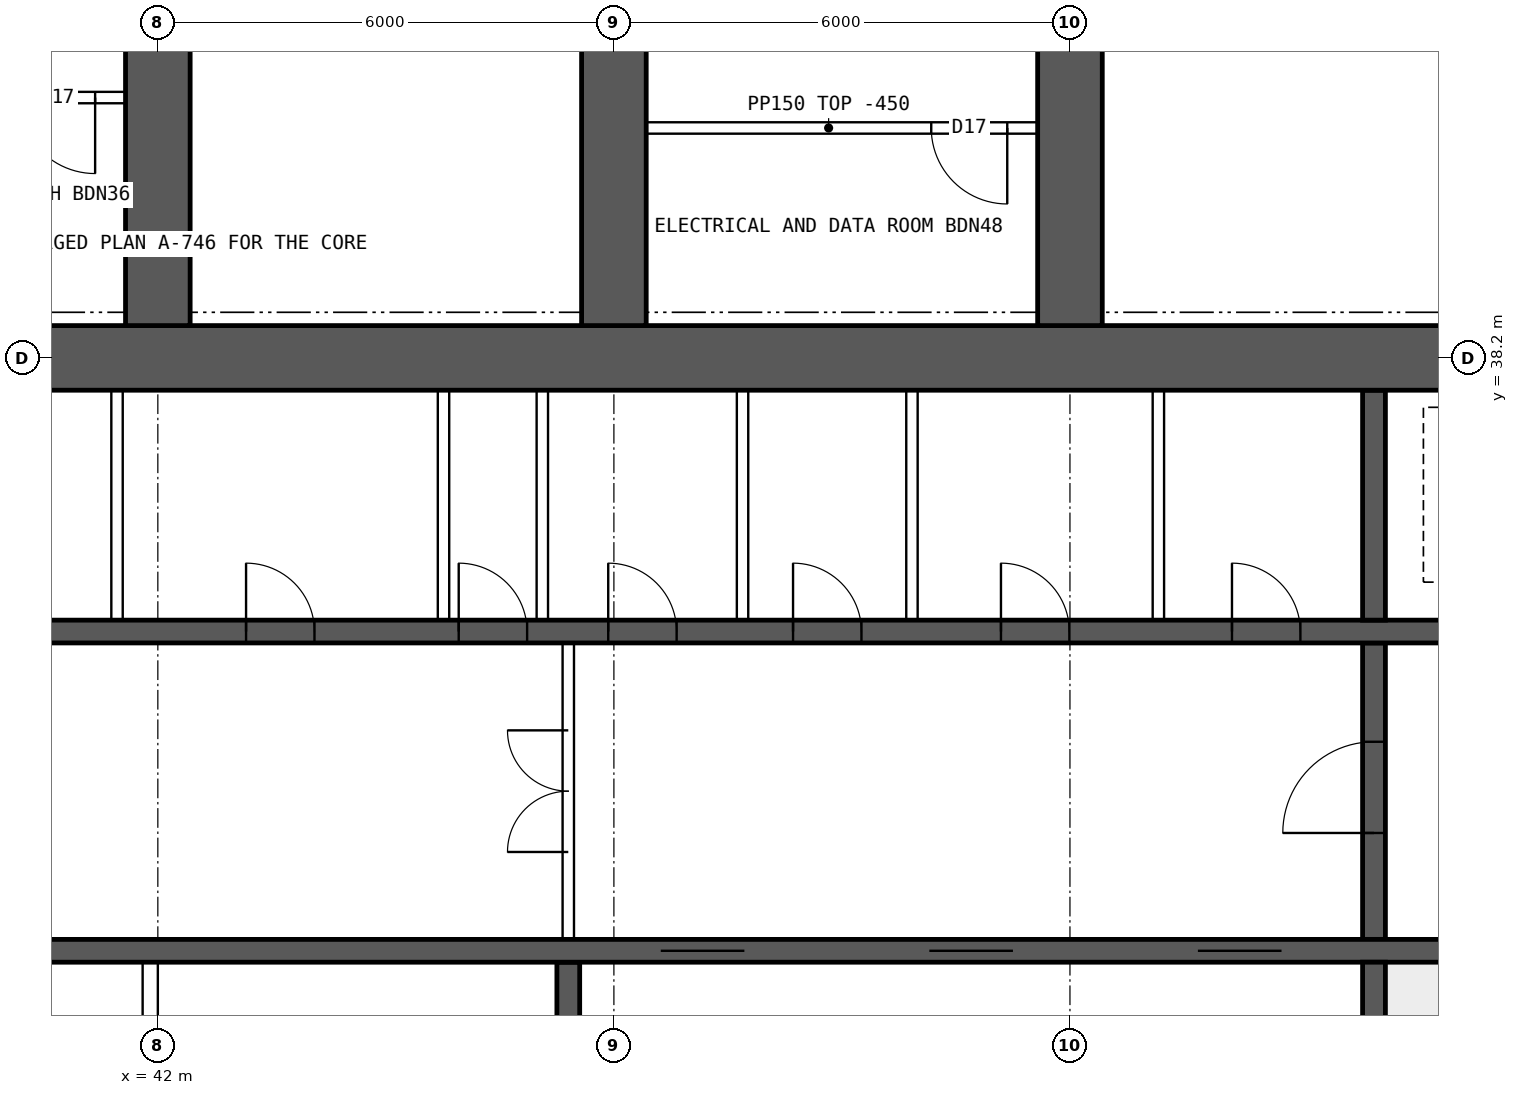
"""IFC4 building model, lengths in metres.
Left out: names, types, materials, properties, quantities, classifications, styles, units other than length and angle.
Written with IfcOpenShell. Run it as: python <this file> out.ifc"""

import sys

from ifc_helpers import new_model, si_unit, direction, frame, frame_2d, origin, place, context, subcontext, project, spatial, rectangle, extrude, element, fill, save


model = new_model("IFC4")
c1 = context("Model", 3, precision=1e-05, world=origin(), true_north=direction((0.0, 1.0)))
c2 = subcontext(c1, "Body", "Model", "MODEL_VIEW")
j1 = project(units=[si_unit("LENGTHUNIT", "METRE"), si_unit("PLANEANGLEUNIT", "RADIAN")], contexts=[c1])
p1 = place(None, origin())
s1 = spatial("IfcSite", under=j1, at=p1, CompositionType="ELEMENT")
p2 = place(p1, origin())
s2 = spatial("IfcBuilding", under=s1, at=p2, CompositionType="ELEMENT")
p3 = place(p2, frame((0.0, 0.0, 174.85)))
s3 = spatial("IfcBuildingStorey", under=s2, at=p3, CompositionType="ELEMENT", Elevation=174.85)
p4 = place(p3, frame((18.0, 38.2, 0.0), z_axis=(0.0, 0.0, 1.0), x_axis=(1.0, 0.0, 0.0)))
e1 = element("IfcWall", 1, at=p4, inside=s3, PredefinedType="SHEAR", context=c2, shape_type="SweptSolid", body=[
    extrude(rectangle(XDim=48.0, YDim=0.85, at=frame_2d((24.0, 0.0))), origin(), (0.0, 0.0, 1.0), 3.75),
])
p5 = place(p3, frame((18.425, 30.4, 0.0), z_axis=(0.0, 0.0, 1.0), x_axis=(1.0, 0.0, 0.0)))
e2 = element("IfcWall", 2, at=p5, inside=s3, PredefinedType="SHEAR", context=c2, shape_type="SweptSolid", body=[
    extrude(rectangle(XDim=47.15, YDim=0.3, at=frame_2d((23.575, 0.0))), origin(), (0.0, 0.0, 1.0), 3.75),
])
p6 = place(p5, frame((0.4, 0.0, 0.0)))
e3 = element("IfcOpeningElement", 3, at=p6, cuts=e2, PredefinedType="OPENING", context=c2, shape_type="SweptSolid", body=[
    extrude(rectangle(XDim=1.0, YDim=2.1, at=frame_2d((0.5, 1.05))), frame((0.0, 0.16, 0.0), z_axis=(0.0, -1.0, 0.0), x_axis=(1.0, 0.0, 0.0)), (0.0, 0.0, 1.0), 0.32),
])
p7 = place(p5, frame((45.75, 0.0, 0.0)))
e4 = element("IfcOpeningElement", 4, at=p7, cuts=e2, PredefinedType="OPENING", context=c2, shape_type="SweptSolid", body=[
    extrude(rectangle(XDim=1.0, YDim=2.1, at=frame_2d((0.5, 1.05))), frame((0.0, 0.16, 0.0), z_axis=(0.0, -1.0, 0.0), x_axis=(1.0, 0.0, 0.0)), (0.0, 0.0, 1.0), 0.32),
])
p8 = place(p5, frame((8.325, 0.0, 0.0)))
e5 = element("IfcOpeningElement", 5, at=p8, cuts=e2, PredefinedType="OPENING", context=c2, shape_type="SweptSolid", body=[
    extrude(rectangle(XDim=1.1, YDim=2.1, at=frame_2d((0.55, 1.05))), frame((0.0, 0.16, 0.0), z_axis=(0.0, -1.0, 0.0), x_axis=(1.0, 0.0, 0.0)), (0.0, 0.0, 1.0), 0.32),
])
p9 = place(p5, frame((10.925, 0.0, 0.0)))
e6 = element("IfcOpeningElement", 6, at=p9, cuts=e2, PredefinedType="OPENING", context=c2, shape_type="SweptSolid", body=[
    extrude(rectangle(XDim=1.1, YDim=2.1, at=frame_2d((0.55, 1.05))), frame((0.0, 0.16, 0.0), z_axis=(0.0, -1.0, 0.0), x_axis=(1.0, 0.0, 0.0)), (0.0, 0.0, 1.0), 0.32),
])
p10 = place(p5, frame((13.525, 0.0, 0.0)))
e7 = element("IfcOpeningElement", 7, at=p10, cuts=e2, PredefinedType="OPENING", context=c2, shape_type="SweptSolid", body=[
    extrude(rectangle(XDim=1.1, YDim=2.1, at=frame_2d((0.55, 1.05))), frame((0.0, 0.16, 0.0), z_axis=(0.0, -1.0, 0.0), x_axis=(1.0, 0.0, 0.0)), (0.0, 0.0, 1.0), 0.32),
])
p11 = place(p5, frame((16.125, 0.0, 0.0)))
e8 = element("IfcOpeningElement", 8, at=p11, cuts=e2, PredefinedType="OPENING", context=c2, shape_type="SweptSolid", body=[
    extrude(rectangle(XDim=1.1, YDim=2.1, at=frame_2d((0.55, 1.05))), frame((0.0, 0.16, 0.0), z_axis=(0.0, -1.0, 0.0), x_axis=(1.0, 0.0, 0.0)), (0.0, 0.0, 1.0), 0.32),
])
p12 = place(p5, frame((18.9, 0.0, 0.0)))
e9 = element("IfcOpeningElement", 9, at=p12, cuts=e2, PredefinedType="OPENING", context=c2, shape_type="SweptSolid", body=[
    extrude(rectangle(XDim=0.9, YDim=2.1, at=frame_2d((0.45, 1.05))), frame((0.0, 0.16, 0.0), z_axis=(0.0, -1.0, 0.0), x_axis=(1.0, 0.0, 0.0)), (0.0, 0.0, 1.0), 0.32),
])
p13 = place(p5, frame((30.192, 0.0, 0.0)))
e10 = element("IfcOpeningElement", 10, at=p13, cuts=e2, PredefinedType="OPENING", context=c2, shape_type="SweptSolid", body=[
    extrude(rectangle(XDim=1.1, YDim=2.1, at=frame_2d((0.55, 1.05))), frame((0.0, 0.16, 0.0), z_axis=(0.0, -1.0, 0.0), x_axis=(1.0, 0.0, 0.0)), (0.0, 0.0, 1.0), 0.32),
])
p14 = place(p5, frame((33.725, 0.0, 0.0)))
e11 = element("IfcOpeningElement", 11, at=p14, cuts=e2, PredefinedType="OPENING", context=c2, shape_type="SweptSolid", body=[
    extrude(rectangle(XDim=1.1, YDim=2.1, at=frame_2d((0.55, 1.05))), frame((0.0, 0.16, 0.0), z_axis=(0.0, -1.0, 0.0), x_axis=(1.0, 0.0, 0.0)), (0.0, 0.0, 1.0), 0.32),
])
p15 = place(p5, frame((37.258, 0.0, 0.0)))
e12 = element("IfcOpeningElement", 12, at=p15, cuts=e2, PredefinedType="OPENING", context=c2, shape_type="SweptSolid", body=[
    extrude(rectangle(XDim=1.1, YDim=2.1, at=frame_2d((0.55, 1.05))), frame((0.0, 0.16, 0.0), z_axis=(0.0, -1.0, 0.0), x_axis=(1.0, 0.0, 0.0)), (0.0, 0.0, 1.0), 0.32),
])
p16 = place(p3, frame((18.425, 34.6, 0.0), z_axis=(0.0, 0.0, 1.0), x_axis=(1.0, 0.0, 0.0)))
e13 = element("IfcWall", 13, at=p16, inside=s3, PredefinedType="SHEAR", context=c2, shape_type="SweptSolid", body=[
    extrude(rectangle(XDim=47.15, YDim=0.3, at=frame_2d((23.575, 0.0))), origin(), (0.0, 0.0, 1.0), 3.75),
])
p17 = place(p16, frame((0.9, 0.0, 0.0)))
e14 = element("IfcOpeningElement", 14, at=p17, cuts=e13, PredefinedType="OPENING", context=c2, shape_type="SweptSolid", body=[
    extrude(rectangle(XDim=1.1, YDim=2.1, at=frame_2d((0.55, 1.05))), frame((0.0, 0.16, 0.0), z_axis=(0.0, -1.0, 0.0), x_axis=(1.0, 0.0, 0.0)), (0.0, 0.0, 1.0), 0.32),
])
p18 = place(p16, frame((45.15, 0.0, 0.0)))
e15 = element("IfcOpeningElement", 15, at=p18, cuts=e13, PredefinedType="OPENING", context=c2, shape_type="SweptSolid", body=[
    extrude(rectangle(XDim=1.1, YDim=2.1, at=frame_2d((0.55, 1.05))), frame((0.0, 0.16, 0.0), z_axis=(0.0, -1.0, 0.0), x_axis=(1.0, 0.0, 0.0)), (0.0, 0.0, 1.0), 0.32),
])
p19 = place(p16, frame((4.175, 0.0, 0.0)))
e16 = element("IfcOpeningElement", 16, at=p19, cuts=e13, PredefinedType="OPENING", context=c2, shape_type="SweptSolid", body=[
    extrude(rectangle(XDim=0.9, YDim=2.1, at=frame_2d((0.45, 1.05))), frame((0.0, 0.16, 0.0), z_axis=(0.0, -1.0, 0.0), x_axis=(1.0, 0.0, 0.0)), (0.0, 0.0, 1.0), 0.32),
])
p20 = place(p16, frame((42.075, 0.0, 0.0)))
e17 = element("IfcOpeningElement", 17, at=p20, cuts=e13, PredefinedType="OPENING", context=c2, shape_type="SweptSolid", body=[
    extrude(rectangle(XDim=0.9, YDim=2.1, at=frame_2d((0.45, 1.05))), frame((0.0, 0.16, 0.0), z_axis=(0.0, -1.0, 0.0), x_axis=(1.0, 0.0, 0.0)), (0.0, 0.0, 1.0), 0.32),
])
p21 = place(p16, frame((8.95, 0.0, 0.0)))
e18 = element("IfcOpeningElement", 18, at=p21, cuts=e13, PredefinedType="OPENING", context=c2, shape_type="SweptSolid", body=[
    extrude(rectangle(XDim=0.9, YDim=2.1, at=frame_2d((0.45, 1.05))), frame((0.0, 0.16, 0.0), z_axis=(0.0, -1.0, 0.0), x_axis=(1.0, 0.0, 0.0)), (0.0, 0.0, 1.0), 0.32),
])
p22 = place(p16, frame((12.924, 0.0, 0.0)))
e19 = element("IfcOpeningElement", 19, at=p22, cuts=e13, PredefinedType="OPENING", context=c2, shape_type="SweptSolid", body=[
    extrude(rectangle(XDim=0.9, YDim=2.1, at=frame_2d((0.45, 1.05))), frame((0.0, 0.16, 0.0), z_axis=(0.0, -1.0, 0.0), x_axis=(1.0, 0.0, 0.0)), (0.0, 0.0, 1.0), 0.32),
])
p23 = place(p16, frame((16.571, 0.0, 0.0)))
e20 = element("IfcOpeningElement", 20, at=p23, cuts=e13, PredefinedType="OPENING", context=c2, shape_type="SweptSolid", body=[
    extrude(rectangle(XDim=0.9, YDim=2.1, at=frame_2d((0.45, 1.05))), frame((0.0, 0.16, 0.0), z_axis=(0.0, -1.0, 0.0), x_axis=(1.0, 0.0, 0.0)), (0.0, 0.0, 1.0), 0.32),
])
p24 = place(p16, frame((20.33, 0.0, 0.0)))
e21 = element("IfcOpeningElement", 21, at=p24, cuts=e13, PredefinedType="OPENING", context=c2, shape_type="SweptSolid", body=[
    extrude(rectangle(XDim=0.9, YDim=2.1, at=frame_2d((0.45, 1.05))), frame((0.0, 0.16, 0.0), z_axis=(0.0, -1.0, 0.0), x_axis=(1.0, 0.0, 0.0)), (0.0, 0.0, 1.0), 0.32),
])
p25 = place(p16, frame((24.736, 0.0, 0.0)))
e22 = element("IfcOpeningElement", 22, at=p25, cuts=e13, PredefinedType="OPENING", context=c2, shape_type="SweptSolid", body=[
    extrude(rectangle(XDim=0.9, YDim=2.1, at=frame_2d((0.45, 1.05))), frame((0.0, 0.16, 0.0), z_axis=(0.0, -1.0, 0.0), x_axis=(1.0, 0.0, 0.0)), (0.0, 0.0, 1.0), 0.32),
])
p26 = place(p16, frame((27.533, 0.0, 0.0)))
e23 = element("IfcOpeningElement", 23, at=p26, cuts=e13, PredefinedType="OPENING", context=c2, shape_type="SweptSolid", body=[
    extrude(rectangle(XDim=0.9, YDim=2.1, at=frame_2d((0.45, 1.05))), frame((0.0, 0.16, 0.0), z_axis=(0.0, -1.0, 0.0), x_axis=(1.0, 0.0, 0.0)), (0.0, 0.0, 1.0), 0.32),
])
p27 = place(p16, frame((29.5, 0.0, 0.0)))
e24 = element("IfcOpeningElement", 24, at=p27, cuts=e13, PredefinedType="OPENING", context=c2, shape_type="SweptSolid", body=[
    extrude(rectangle(XDim=0.9, YDim=2.1, at=frame_2d((0.45, 1.05))), frame((0.0, 0.16, 0.0), z_axis=(0.0, -1.0, 0.0), x_axis=(1.0, 0.0, 0.0)), (0.0, 0.0, 1.0), 0.32),
])
p28 = place(p16, frame((31.932, 0.0, 0.0)))
e25 = element("IfcOpeningElement", 25, at=p28, cuts=e13, PredefinedType="OPENING", context=c2, shape_type="SweptSolid", body=[
    extrude(rectangle(XDim=0.9, YDim=2.1, at=frame_2d((0.45, 1.05))), frame((0.0, 0.16, 0.0), z_axis=(0.0, -1.0, 0.0), x_axis=(1.0, 0.0, 0.0)), (0.0, 0.0, 1.0), 0.32),
])
p29 = place(p16, frame((34.667, 0.0, 0.0)))
e26 = element("IfcOpeningElement", 26, at=p29, cuts=e13, PredefinedType="OPENING", context=c2, shape_type="SweptSolid", body=[
    extrude(rectangle(XDim=0.9, YDim=2.1, at=frame_2d((0.45, 1.05))), frame((0.0, 0.16, 0.0), z_axis=(0.0, -1.0, 0.0), x_axis=(1.0, 0.0, 0.0)), (0.0, 0.0, 1.0), 0.32),
])
p30 = place(p16, frame((37.707, 0.0, 0.0)))
e27 = element("IfcOpeningElement", 27, at=p30, cuts=e13, PredefinedType="OPENING", context=c2, shape_type="SweptSolid", body=[
    extrude(rectangle(XDim=0.9, YDim=2.1, at=frame_2d((0.45, 1.05))), frame((0.0, 0.16, 0.0), z_axis=(0.0, -1.0, 0.0), x_axis=(1.0, 0.0, 0.0)), (0.0, 0.0, 1.0), 0.32),
])
p31 = place(p3, frame((58.0, 26.225, 0.0), z_axis=(0.0, 0.0, 1.0), x_axis=(0.0, 1.0, 0.0)))
e28 = element("IfcWall", 28, at=p31, inside=s3, PredefinedType="SHEAR", context=c2, shape_type="SweptSolid", body=[
    extrude(rectangle(XDim=4.025, YDim=0.3, at=frame_2d((2.012, 0.0))), origin(), (0.0, 0.0, 1.0), 3.75),
])
p32 = place(p3, frame((58.0, 30.55, 0.0), z_axis=(0.0, 0.0, 1.0), x_axis=(0.0, 1.0, 0.0)))
e29 = element("IfcWall", 29, at=p32, inside=s3, PredefinedType="SHEAR", context=c2, shape_type="SweptSolid", body=[
    extrude(rectangle(XDim=3.9, YDim=0.3, at=frame_2d((1.95, 0.0))), origin(), (0.0, 0.0, 1.0), 3.75),
])
p33 = place(p32, frame((1.4, 0.0, 0.0)))
e30 = element("IfcOpeningElement", 30, at=p33, cuts=e29, PredefinedType="OPENING", context=c2, shape_type="SweptSolid", body=[
    extrude(rectangle(XDim=1.2, YDim=2.1, at=frame_2d((0.6, 1.05))), frame((0.0, 0.16, 0.0), z_axis=(0.0, -1.0, 0.0), x_axis=(1.0, 0.0, 0.0)), (0.0, 0.0, 1.0), 0.32),
])
p34 = place(p3, frame((58.0, 34.75, 0.0), z_axis=(0.0, 0.0, 1.0), x_axis=(0.0, 1.0, 0.0)))
e31 = element("IfcWall", 31, at=p34, inside=s3, PredefinedType="SHEAR", context=c2, shape_type="SweptSolid", body=[
    extrude(rectangle(XDim=3.025, YDim=0.3, at=frame_2d((1.512, 0.0))), origin(), (0.0, 0.0, 1.0), 3.75),
])
p35 = place(p3, frame((47.4, 26.225, 0.0), z_axis=(0.0, 0.0, 1.0), x_axis=(0.0, 1.0, 0.0)))
e32 = element("IfcWall", 32, at=p35, inside=s3, PredefinedType="SHEAR", context=c2, shape_type="SweptSolid", body=[
    extrude(rectangle(XDim=4.025, YDim=0.3, at=frame_2d((2.012, 0.0))), origin(), (0.0, 0.0, 1.0), 3.75),
])
for number, where, z_axis, x_axis in (
    (33, (42.0, 38.625, 0.0), (0.0, 0.0, 1.0), (0.0, 1.0, 0.0)),
    (34, (48.0, 38.625, 0.0), (0.0, 0.0, 1.0), (0.0, 1.0, 0.0)),
    (35, (54.0, 38.625, 0.0), (0.0, 0.0, 1.0), (0.0, 1.0, 0.0)),
):
    element("IfcWall", number, at=place(p3, frame(where, z_axis=z_axis, x_axis=x_axis)), inside=s3, PredefinedType="SHEAR", context=c2, shape_type="SweptSolid", body=[
        extrude(rectangle(XDim=8.175, YDim=0.85, at=frame_2d((4.087, 0.0))), origin(), (0.0, 0.0, 1.0), 3.75),
    ])
p36 = place(p3, frame((47.4, 30.55, 0.0), z_axis=(0.0, 0.0, 1.0), x_axis=(0.0, 1.0, 0.0)))
e36 = element("IfcWall", 36, at=p36, inside=s3, PredefinedType="SOLIDWALL", context=c2, shape_type="SweptSolid", body=[
    extrude(rectangle(XDim=3.9, YDim=0.15, at=frame_2d((1.95, 0.0))), origin(), (0.0, 0.0, 1.0), 3.3),
])
p37 = place(p36, frame((1.15, 0.0, 0.0)))
e37 = element("IfcOpeningElement", 37, at=p37, cuts=e36, PredefinedType="OPENING", context=c2, shape_type="SweptSolid", body=[
    extrude(rectangle(XDim=1.6, YDim=2.1, at=frame_2d((0.8, 1.05))), frame((0.0, 0.085, 0.0), z_axis=(0.0, -1.0, 0.0), x_axis=(1.0, 0.0, 0.0)), (0.0, 0.0, 1.0), 0.17),
])
for number, where, z_axis, x_axis in (
    (38, (41.463, 34.75, 0.0), (0.0, 0.0, 1.0), (0.0, 1.0, 0.0)),
    (39, (45.758, 34.75, 0.0), (0.0, 0.0, 1.0), (0.0, 1.0, 0.0)),
    (40, (47.058, 34.75, 0.0), (0.0, 0.0, 1.0), (0.0, 1.0, 0.0)),
    (41, (49.692, 34.75, 0.0), (0.0, 0.0, 1.0), (0.0, 1.0, 0.0)),
    (42, (51.921, 34.75, 0.0), (0.0, 0.0, 1.0), (0.0, 1.0, 0.0)),
    (43, (55.163, 34.75, 0.0), (0.0, 0.0, 1.0), (0.0, 1.0, 0.0)),
):
    element("IfcWall", number, at=place(p3, frame(where, z_axis=z_axis, x_axis=x_axis)), inside=s3, PredefinedType="SOLIDWALL", context=c2, shape_type="SweptSolid", body=[
        extrude(rectangle(XDim=3.025, YDim=0.15, at=frame_2d((1.512, 0.0))), origin(), (0.0, 0.0, 1.0), 3.3),
    ])
p38 = place(p3, frame((41.9, 26.225, 0.0), z_axis=(0.0, 0.0, 1.0), x_axis=(0.0, 1.0, 0.0)))
e44 = element("IfcWall", 44, at=p38, inside=s3, PredefinedType="SOLIDWALL", context=c2, shape_type="SweptSolid", body=[
    extrude(rectangle(XDim=4.025, YDim=0.2, at=frame_2d((2.012, 0.0))), origin(), (0.0, 0.0, 1.0), 3.3),
])
p39 = place(p3, frame((41.575, 41.625, 0.0), z_axis=(0.0, 0.0, 1.0), x_axis=(-1.0, 0.0, 0.0)))
e45 = element("IfcWall", 45, at=p39, inside=s3, PredefinedType="PARTITIONING", context=c2, shape_type="SweptSolid", body=[
    extrude(rectangle(XDim=5.5, YDim=0.15, at=frame_2d((2.75, 0.0))), origin(), (0.0, 0.0, 1.0), 3.3),
])
p40 = place(p39, frame((0.4, 0.0, 0.0)))
e46 = element("IfcOpeningElement", 46, at=p40, cuts=e45, PredefinedType="OPENING", context=c2, shape_type="SweptSolid", body=[
    extrude(rectangle(XDim=1.0, YDim=2.1, at=frame_2d((0.5, 1.05))), frame((0.0, 0.085, 0.0), z_axis=(0.0, -1.0, 0.0), x_axis=(1.0, 0.0, 0.0)), (0.0, 0.0, 1.0), 0.17),
])
p41 = place(p3, frame((53.575, 41.225, 0.0), z_axis=(0.0, 0.0, 1.0), x_axis=(-1.0, 0.0, 0.0)))
e47 = element("IfcWall", 47, at=p41, inside=s3, PredefinedType="PARTITIONING", context=c2, shape_type="SweptSolid", body=[
    extrude(rectangle(XDim=5.5, YDim=0.15, at=frame_2d((2.75, 0.0))), origin(), (0.0, 0.0, 1.0), 3.3),
])
p42 = place(p41, frame((0.4, 0.0, 0.0)))
e48 = element("IfcOpeningElement", 48, at=p42, cuts=e47, PredefinedType="OPENING", context=c2, shape_type="SweptSolid", body=[
    extrude(rectangle(XDim=1.0, YDim=2.1, at=frame_2d((0.5, 1.05))), frame((0.0, 0.085, 0.0), z_axis=(0.0, -1.0, 0.0), x_axis=(1.0, 0.0, 0.0)), (0.0, 0.0, 1.0), 0.17),
])
p43 = place(p37, origin())
e49 = element("IfcDoor", 49, at=p43, inside=s3, OperationType="DOUBLE_DOOR_SINGLE_SWING", PredefinedType="DOOR", context=c2, shape_type="SweptSolid", body=[
    extrude(rectangle(XDim=1.6, YDim=2.1, at=frame_2d((0.8, 1.05))), frame((0.0, 0.025, 0.0), z_axis=(0.0, -1.0, 0.0), x_axis=(1.0, 0.0, 0.0)), (0.0, 0.0, 1.0), 0.05),
])
fill(e37, e49)
p44 = place(p33, origin())
e50 = element("IfcDoor", 50, at=p44, inside=s3, OperationType="SINGLE_SWING_LEFT", PredefinedType="DOOR", context=c2, shape_type="SweptSolid", body=[
    extrude(rectangle(XDim=1.2, YDim=2.1, at=frame_2d((0.6, 1.05))), frame((0.0, 0.025, 0.0), z_axis=(0.0, -1.0, 0.0), x_axis=(1.0, 0.0, 0.0)), (0.0, 0.0, 1.0), 0.05),
])
fill(e30, e50)
p45 = place(p25, origin())
e51 = element("IfcDoor", 51, at=p45, inside=s3, OperationType="SINGLE_SWING_LEFT", PredefinedType="DOOR", context=c2, shape_type="SweptSolid", body=[
    extrude(rectangle(XDim=0.9, YDim=2.1, at=frame_2d((0.45, 1.05))), frame((0.0, 0.025, 0.0), z_axis=(0.0, -1.0, 0.0), x_axis=(1.0, 0.0, 0.0)), (0.0, 0.0, 1.0), 0.05),
])
fill(e22, e51)
p46 = place(p26, origin())
e52 = element("IfcDoor", 52, at=p46, inside=s3, OperationType="SINGLE_SWING_LEFT", PredefinedType="DOOR", context=c2, shape_type="SweptSolid", body=[
    extrude(rectangle(XDim=0.9, YDim=2.1, at=frame_2d((0.45, 1.05))), frame((0.0, 0.025, 0.0), z_axis=(0.0, -1.0, 0.0), x_axis=(1.0, 0.0, 0.0)), (0.0, 0.0, 1.0), 0.05),
])
fill(e23, e52)
p47 = place(p27, origin())
e53 = element("IfcDoor", 53, at=p47, inside=s3, OperationType="SINGLE_SWING_LEFT", PredefinedType="DOOR", context=c2, shape_type="SweptSolid", body=[
    extrude(rectangle(XDim=0.9, YDim=2.1, at=frame_2d((0.45, 1.05))), frame((0.0, 0.025, 0.0), z_axis=(0.0, -1.0, 0.0), x_axis=(1.0, 0.0, 0.0)), (0.0, 0.0, 1.0), 0.05),
])
fill(e24, e53)
p48 = place(p28, origin())
e54 = element("IfcDoor", 54, at=p48, inside=s3, OperationType="SINGLE_SWING_LEFT", PredefinedType="DOOR", context=c2, shape_type="SweptSolid", body=[
    extrude(rectangle(XDim=0.9, YDim=2.1, at=frame_2d((0.45, 1.05))), frame((0.0, 0.025, 0.0), z_axis=(0.0, -1.0, 0.0), x_axis=(1.0, 0.0, 0.0)), (0.0, 0.0, 1.0), 0.05),
])
fill(e25, e54)
p49 = place(p29, origin())
e55 = element("IfcDoor", 55, at=p49, inside=s3, OperationType="SINGLE_SWING_LEFT", PredefinedType="DOOR", context=c2, shape_type="SweptSolid", body=[
    extrude(rectangle(XDim=0.9, YDim=2.1, at=frame_2d((0.45, 1.05))), frame((0.0, 0.025, 0.0), z_axis=(0.0, -1.0, 0.0), x_axis=(1.0, 0.0, 0.0)), (0.0, 0.0, 1.0), 0.05),
])
fill(e26, e55)
p50 = place(p30, origin())
e56 = element("IfcDoor", 56, at=p50, inside=s3, OperationType="SINGLE_SWING_LEFT", PredefinedType="DOOR", context=c2, shape_type="SweptSolid", body=[
    extrude(rectangle(XDim=0.9, YDim=2.1, at=frame_2d((0.45, 1.05))), frame((0.0, 0.025, 0.0), z_axis=(0.0, -1.0, 0.0), x_axis=(1.0, 0.0, 0.0)), (0.0, 0.0, 1.0), 0.05),
])
fill(e27, e56)
p51 = place(p13, origin())
e57 = element("IfcDoor", 57, at=p51, inside=s3, OperationType="DOUBLE_DOOR_SLIDING", PredefinedType="DOOR", context=c2, shape_type="SweptSolid", body=[
    extrude(rectangle(XDim=1.1, YDim=2.1, at=frame_2d((0.55, 1.05))), frame((0.0, 0.025, 0.0), z_axis=(0.0, -1.0, 0.0), x_axis=(1.0, 0.0, 0.0)), (0.0, 0.0, 1.0), 0.05),
])
fill(e10, e57)
p52 = place(p14, origin())
e58 = element("IfcDoor", 58, at=p52, inside=s3, OperationType="DOUBLE_DOOR_SLIDING", PredefinedType="DOOR", context=c2, shape_type="SweptSolid", body=[
    extrude(rectangle(XDim=1.1, YDim=2.1, at=frame_2d((0.55, 1.05))), frame((0.0, 0.025, 0.0), z_axis=(0.0, -1.0, 0.0), x_axis=(1.0, 0.0, 0.0)), (0.0, 0.0, 1.0), 0.05),
])
fill(e11, e58)
p53 = place(p15, origin())
e59 = element("IfcDoor", 59, at=p53, inside=s3, OperationType="DOUBLE_DOOR_SLIDING", PredefinedType="DOOR", context=c2, shape_type="SweptSolid", body=[
    extrude(rectangle(XDim=1.1, YDim=2.1, at=frame_2d((0.55, 1.05))), frame((0.0, 0.025, 0.0), z_axis=(0.0, -1.0, 0.0), x_axis=(1.0, 0.0, 0.0)), (0.0, 0.0, 1.0), 0.05),
])
fill(e12, e59)
p54 = place(p40, origin())
e60 = element("IfcDoor", 60, at=p54, inside=s3, OperationType="SINGLE_SWING_LEFT", PredefinedType="DOOR", context=c2, shape_type="SweptSolid", body=[
    extrude(rectangle(XDim=1.0, YDim=2.1, at=frame_2d((0.5, 1.05))), frame((0.0, 0.025, 0.0), z_axis=(0.0, -1.0, 0.0), x_axis=(1.0, 0.0, 0.0)), (0.0, 0.0, 1.0), 0.05),
])
fill(e46, e60)
p55 = place(p42, origin())
e61 = element("IfcDoor", 61, at=p55, inside=s3, OperationType="SINGLE_SWING_LEFT", PredefinedType="DOOR", context=c2, shape_type="SweptSolid", body=[
    extrude(rectangle(XDim=1.0, YDim=2.1, at=frame_2d((0.5, 1.05))), frame((0.0, 0.025, 0.0), z_axis=(0.0, -1.0, 0.0), x_axis=(1.0, 0.0, 0.0)), (0.0, 0.0, 1.0), 0.05),
])
fill(e48, e61)
save(model, sys.argv[1])
